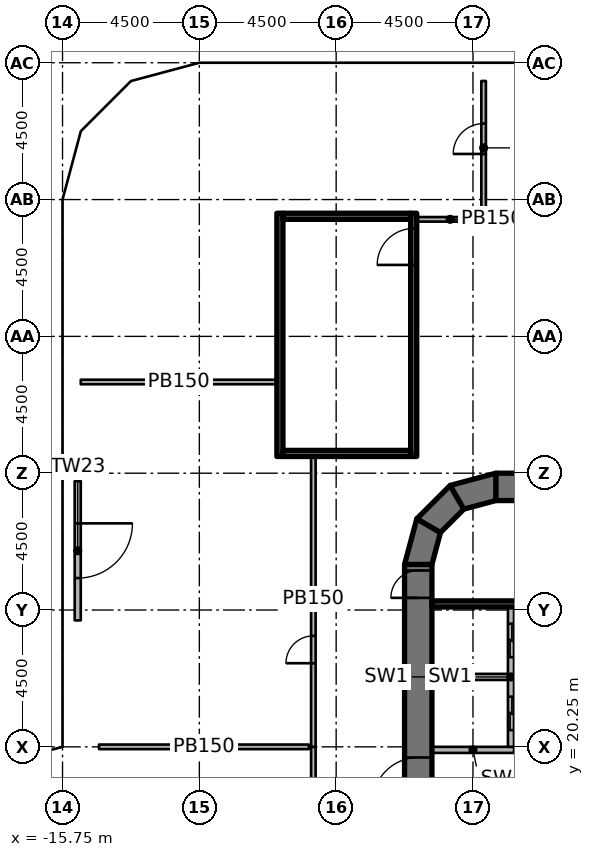
"""IFC4 building model, lengths in metres.
Left out: names, types, materials, properties, quantities, classifications, styles, units other than length and angle.
Written with IfcOpenShell. Run it as: python <this file> out.ifc"""

import sys

from ifc_helpers import new_model, si_unit, direction, frame, frame_2d, origin, origin_2d, place, context, subcontext, project, spatial, polyline, rectangle, outline, extrude, element, fill, save


model = new_model("IFC4")
c1 = context("Model", 3, precision=1e-05, world=origin(), true_north=direction((0.0, 1.0)))
c2 = subcontext(c1, "Body", "Model", "MODEL_VIEW")
j1 = project(units=[si_unit("LENGTHUNIT", "METRE"), si_unit("PLANEANGLEUNIT", "RADIAN")], contexts=[c1])
p1 = place(None, origin())
s1 = spatial("IfcSite", under=j1, at=p1, CompositionType="ELEMENT")
p2 = place(p1, origin())
s2 = spatial("IfcBuilding", under=s1, at=p2, CompositionType="ELEMENT")
p3 = place(p2, frame((0.0, 0.0, 17.0)))
s3 = spatial("IfcBuildingStorey", under=s2, at=p3, CompositionType="ELEMENT", Elevation=17.0)
for number, where, z_axis, x_axis in (
    (1, (-15.15, 19.65, 0.0), (0.0, 0.0, 1.0), (1.0, 0.0, 0.0)),
    (2, (-15.15, 33.75, 0.0), (0.0, 0.0, 1.0), (1.0, 0.0, 0.0)),
    (3, (-10.65, 29.25, 0.0), (0.0, 0.0, 1.0), (1.0, 0.0, 0.0)),
    (4, (-11.25, 41.97, 0.0), (0.0, 0.0, 1.0), (1.0, 0.0, 0.0)),
    (5, (-6.25, 20.25, 0.0), (0.0, 0.0, 1.0), (1.0, 0.0, 0.0)),
    (6, (-6.25, 24.65, 0.0), (0.0, 0.0, 1.0), (1.0, 0.0, 0.0)),
    (7, (-6.25, 26.7, 0.0), (0.0, 0.0, 1.0), (1.0, 0.0, 0.0)),
    (8, (-2.25, 33.11, 0.0), (0.0, 0.0, 1.0), (1.0, 0.0, 0.0)),
):
    element("IfcColumn", number, at=place(p3, frame(where, z_axis=z_axis, x_axis=x_axis)), inside=s3, PredefinedType="COLUMN", context=c2, shape_type="SweptSolid", body=[
        extrude(rectangle(XDim=1.2, YDim=1.2, at=origin_2d()), origin(), (0.0, 0.0, 1.0), 4.55),
    ])
p4 = place(p3, frame((-4.05, 11.25, 0.0), z_axis=(0.0, 0.0, 1.0), x_axis=(0.0, 1.0, 0.0)))
e9 = element("IfcWall", 9, at=p4, inside=s3, PredefinedType="SHEAR", context=c2, shape_type="SweptSolid", body=[
    extrude(rectangle(XDim=15.0, YDim=0.9, at=frame_2d((7.5, 0.0))), origin(), (0.0, 0.0, 1.0), 5.0),
])
p5 = place(p4, frame((7.15, 0.0, 0.0)))
e10 = element("IfcOpeningElement", 10, at=p5, cuts=e9, PredefinedType="OPENING", context=c2, shape_type="SweptSolid", body=[
    extrude(rectangle(XDim=1.5, YDim=2.3, at=frame_2d((0.75, 1.15))), frame((0.0, 0.46, 0.0), z_axis=(0.0, -1.0, 0.0), x_axis=(1.0, 0.0, 0.0)), (0.0, 0.0, 1.0), 0.92),
])
p6 = place(p4, frame((13.9, 0.0, 0.0)))
e11 = element("IfcOpeningElement", 11, at=p6, cuts=e9, PredefinedType="OPENING", context=c2, shape_type="SweptSolid", body=[
    extrude(rectangle(XDim=0.9, YDim=2.1, at=frame_2d((0.45, 1.05))), frame((0.0, 0.46, 0.0), z_axis=(0.0, -1.0, 0.0), x_axis=(1.0, 0.0, 0.0)), (0.0, 0.0, 1.0), 0.92),
])
p7 = place(p4, frame((1.15, 0.0, 0.0)))
e12 = element("IfcOpeningElement", 12, at=p7, cuts=e9, PredefinedType="OPENING", context=c2, shape_type="SweptSolid", body=[
    extrude(rectangle(XDim=1.2, YDim=2.1, at=frame_2d((0.6, 1.05))), frame((0.0, 0.46, 0.0), z_axis=(0.0, -1.0, 0.0), x_axis=(1.0, 0.0, 0.0)), (0.0, 0.0, 1.0), 0.92),
])
p8 = place(p3, frame((-1.5, 28.8, 0.0), z_axis=(0.0, 0.0, 1.0), x_axis=(1.0, 0.0, 0.0)))
e13 = element("IfcWall", 13, at=p8, inside=s3, PredefinedType="SHEAR", context=c2, shape_type="SweptSolid", body=[
    extrude(rectangle(XDim=3.0, YDim=0.9, at=frame_2d((1.5, 0.0))), origin(), (0.0, 0.0, 1.0), 5.0),
])
p9 = place(p3, origin())
e14 = element("IfcWall", 14, at=p9, inside=s3, PredefinedType="SHEAR", context=c2, shape_type="SweptSolid", body=[
    extrude(outline(polyline([(-4.5, 26.25), (-4.098, 27.75), (-3.319, 27.3), (-3.6, 26.25), (-4.5, 26.25)])), origin(), (0.0, 0.0, 1.0), 5.0),
])
p10 = place(p3, origin())
e15 = element("IfcWall", 15, at=p10, inside=s3, PredefinedType="SHEAR", context=c2, shape_type="SweptSolid", body=[
    extrude(outline(polyline([(-4.098, 27.75), (-3.0, 28.848), (-2.55, 28.069), (-3.319, 27.3), (-4.098, 27.75)])), origin(), (0.0, 0.0, 1.0), 5.0),
])
p11 = place(p3, origin())
e16 = element("IfcWall", 16, at=p11, inside=s3, PredefinedType="SHEAR", context=c2, shape_type="SweptSolid", body=[
    extrude(outline(polyline([(-3.0, 28.848), (-1.5, 29.25), (-1.5, 28.35), (-2.55, 28.069), (-3.0, 28.848)])), origin(), (0.0, 0.0, 1.0), 5.0),
])
p12 = place(p3, frame((-15.25, 28.99, 0.0), z_axis=(0.0, 0.0, 1.0), x_axis=(0.0, -1.0, 0.0)))
e17 = element("IfcWall", 17, at=p12, inside=s3, PredefinedType="SOLIDWALL", context=c2, shape_type="SweptSolid", body=[
    extrude(rectangle(XDim=4.58, YDim=0.2, at=frame_2d((2.29, 0.0))), origin(), (0.0, 0.0, 1.0), 4.55),
])
p13 = place(p12, frame((1.39, 0.0, 0.0)))
e18 = element("IfcOpeningElement", 18, at=p13, cuts=e17, PredefinedType="OPENING", context=c2, shape_type="SweptSolid", body=[
    extrude(rectangle(XDim=1.8, YDim=2.4, at=frame_2d((0.9, 1.2))), frame((0.0, 0.11, 0.0), z_axis=(0.0, -1.0, 0.0), x_axis=(1.0, 0.0, 0.0)), (0.0, 0.0, 1.0), 0.22),
])
p14 = place(p3, frame((-3.6, 24.95, 0.0), z_axis=(0.0, 0.0, 1.0), x_axis=(1.0, 0.0, 0.0)))
e19 = element("IfcWall", 19, at=p14, inside=s3, PredefinedType="SHEAR", context=c2, shape_type="SweptSolid", body=[
    extrude(rectangle(XDim=7.2, YDim=0.2, at=frame_2d((3.6, 0.0))), origin(), (0.0, 0.0, 1.0), 4.55),
])
p15 = place(p3, frame((-3.6, 20.15, 0.0), z_axis=(0.0, 0.0, 1.0), x_axis=(1.0, 0.0, 0.0)))
e20 = element("IfcWall", 20, at=p15, inside=s3, PredefinedType="PARTITIONING", context=c2, shape_type="SweptSolid", body=[
    extrude(rectangle(XDim=2.7, YDim=0.2, at=frame_2d((1.35, 0.0))), origin(), (0.0, 0.0, 1.0), 4.55),
])
p16 = place(p3, frame((-1.0, 24.85, 0.0), z_axis=(0.0, 0.0, 1.0), x_axis=(0.0, -1.0, 0.0)))
e21 = element("IfcWall", 21, at=p16, inside=s3, PredefinedType="PARTITIONING", context=c2, shape_type="SweptSolid", body=[
    extrude(rectangle(XDim=4.6, YDim=0.2, at=frame_2d((2.3, 0.0))), origin(), (0.0, 0.0, 1.0), 4.55),
])
p17 = place(p16, frame((0.55, 0.0, 0.0)))
e22 = element("IfcOpeningElement", 22, at=p17, cuts=e21, PredefinedType="OPENING", context=c2, shape_type="SweptSolid", body=[
    extrude(rectangle(XDim=1.1, YDim=2.3, at=frame_2d((0.55, 1.15))), frame((0.0, 0.11, 0.0), z_axis=(0.0, -1.0, 0.0), x_axis=(1.0, 0.0, 0.0)), (0.0, 0.0, 1.0), 0.22),
])
p18 = place(p16, frame((2.95, 0.0, 0.0)))
e23 = element("IfcOpeningElement", 23, at=p18, cuts=e21, PredefinedType="OPENING", context=c2, shape_type="SweptSolid", body=[
    extrude(rectangle(XDim=1.1, YDim=2.3, at=frame_2d((0.55, 1.15))), frame((0.0, 0.11, 0.0), z_axis=(0.0, -1.0, 0.0), x_axis=(1.0, 0.0, 0.0)), (0.0, 0.0, 1.0), 0.22),
])
p19 = place(p3, frame((-3.6, 22.55, 0.0), z_axis=(0.0, 0.0, 1.0), x_axis=(1.0, 0.0, 0.0)))
e24 = element("IfcWall", 24, at=p19, inside=s3, PredefinedType="PARTITIONING", context=c2, shape_type="SweptSolid", body=[
    extrude(rectangle(XDim=2.5, YDim=0.2, at=frame_2d((1.25, 0.0))), origin(), (0.0, 0.0, 1.0), 4.55),
])
p20 = place(p3, frame((-8.6, 29.8, 0.0), z_axis=(0.0, 0.0, 1.0), x_axis=(0.0, 1.0, 0.0)))
e25 = element("IfcWall", 25, at=p20, inside=s3, PredefinedType="SHEAR", context=c2, shape_type="SweptSolid", body=[
    extrude(rectangle(XDim=8.0, YDim=0.2, at=frame_2d((4.0, 0.0))), origin(), (0.0, 0.0, 1.0), 4.55),
])
p21 = place(p3, frame((-4.2, 29.8, 0.0), z_axis=(0.0, 0.0, 1.0), x_axis=(0.0, 1.0, 0.0)))
e26 = element("IfcWall", 26, at=p21, inside=s3, PredefinedType="SHEAR", context=c2, shape_type="SweptSolid", body=[
    extrude(rectangle(XDim=8.0, YDim=0.2, at=frame_2d((4.0, 0.0))), origin(), (0.0, 0.0, 1.0), 4.55),
])
p22 = place(p21, frame((6.3, 0.0, 0.0)))
e27 = element("IfcOpeningElement", 27, at=p22, cuts=e26, PredefinedType="OPENING", context=c2, shape_type="SweptSolid", body=[
    extrude(rectangle(XDim=1.2, YDim=2.1, at=frame_2d((0.6, 1.05))), frame((0.0, 0.11, 0.0), z_axis=(0.0, -1.0, 0.0), x_axis=(1.0, 0.0, 0.0)), (0.0, 0.0, 1.0), 0.22),
])
for number, where, z_axis, x_axis in (
    (28, (-8.5, 29.9, 0.0), (0.0, 0.0, 1.0), (1.0, 0.0, 0.0)),
    (29, (-8.5, 37.7, 0.0), (0.0, 0.0, 1.0), (1.0, 0.0, 0.0)),
):
    element("IfcWall", number, at=place(p3, frame(where, z_axis=z_axis, x_axis=x_axis)), inside=s3, PredefinedType="SHEAR", context=c2, shape_type="SweptSolid", body=[
        extrude(rectangle(XDim=4.2, YDim=0.2, at=frame_2d((2.1, 0.0))), origin(), (0.0, 0.0, 1.0), 4.55),
    ])
p23 = place(p3, frame((-4.1, 37.6, 0.0), z_axis=(0.0, 0.0, 1.0), x_axis=(1.0, 0.0, 0.0)))
e30 = element("IfcWall", 30, at=p23, inside=s3, PredefinedType="PARTITIONING", context=c2, shape_type="SweptSolid", body=[
    extrude(rectangle(XDim=2.2, YDim=0.15, at=frame_2d((1.1, 0.0))), origin(), (0.0, 0.0, 1.0), 4.55),
])
p24 = place(p3, frame((-7.5, 8.25, 0.0), z_axis=(0.0, 0.0, 1.0), x_axis=(0.0, 1.0, 0.0)))
e31 = element("IfcWall", 31, at=p24, inside=s3, PredefinedType="PARTITIONING", context=c2, shape_type="SweptSolid", body=[
    extrude(rectangle(XDim=12.0, YDim=0.15, at=frame_2d((6.0, 0.0))), origin(), (0.0, 0.0, 1.0), 4.55),
])
p25 = place(p24, frame((3.5, 0.0, 0.0)))
e32 = element("IfcOpeningElement", 32, at=p25, cuts=e31, PredefinedType="OPENING", context=c2, shape_type="SweptSolid", body=[
    extrude(rectangle(XDim=1.0, YDim=2.1, at=frame_2d((0.5, 1.05))), frame((0.0, 0.085, 0.0), z_axis=(0.0, -1.0, 0.0), x_axis=(1.0, 0.0, 0.0)), (0.0, 0.0, 1.0), 0.17),
])
p26 = place(p3, frame((-7.5, 20.25, 0.0), z_axis=(0.0, 0.0, 1.0), x_axis=(0.0, 1.0, 0.0)))
e33 = element("IfcWall", 33, at=p26, inside=s3, PredefinedType="PARTITIONING", context=c2, shape_type="SweptSolid", body=[
    extrude(rectangle(XDim=9.75, YDim=0.15, at=frame_2d((4.875, 0.0))), origin(), (0.0, 0.0, 1.0), 4.55),
])
p27 = place(p26, frame((2.75, 0.0, 0.0)))
e34 = element("IfcOpeningElement", 34, at=p27, cuts=e33, PredefinedType="OPENING", context=c2, shape_type="SweptSolid", body=[
    extrude(rectangle(XDim=0.9, YDim=2.1, at=frame_2d((0.45, 1.05))), frame((0.0, 0.085, 0.0), z_axis=(0.0, -1.0, 0.0), x_axis=(1.0, 0.0, 0.0)), (0.0, 0.0, 1.0), 0.17),
])
p28 = place(p3, frame((-1.9, 37.75, 0.0), z_axis=(0.0, 0.0, 1.0), x_axis=(0.0, 1.0, 0.0)))
e35 = element("IfcWall", 35, at=p28, inside=s3, PredefinedType="PARTITIONING", context=c2, shape_type="SweptSolid", body=[
    extrude(rectangle(XDim=4.4, YDim=0.15, at=frame_2d((2.2, 0.0))), origin(), (0.0, 0.0, 1.0), 4.55),
])
p29 = place(p28, frame((2.0, 0.0, 0.0)))
e36 = element("IfcOpeningElement", 36, at=p29, cuts=e35, PredefinedType="OPENING", context=c2, shape_type="SweptSolid", body=[
    extrude(rectangle(XDim=1.0, YDim=2.1, at=frame_2d((0.5, 1.05))), frame((0.0, 0.085, 0.0), z_axis=(0.0, -1.0, 0.0), x_axis=(1.0, 0.0, 0.0)), (0.0, 0.0, 1.0), 0.17),
])
p30 = place(p3, frame((-14.55, 20.25, 0.0), z_axis=(0.0, 0.0, 1.0), x_axis=(1.0, 0.0, 0.0)))
e37 = element("IfcWall", 37, at=p30, inside=s3, PredefinedType="PARTITIONING", context=c2, shape_type="SweptSolid", body=[
    extrude(rectangle(XDim=6.9, YDim=0.15, at=frame_2d((3.45, 0.0))), origin(), (0.0, 0.0, 1.0), 4.55),
])
p31 = place(p3, frame((-15.15, 32.25, 0.0), z_axis=(0.0, 0.0, 1.0), x_axis=(1.0, 0.0, 0.0)))
e38 = element("IfcWall", 38, at=p31, inside=s3, PredefinedType="PARTITIONING", context=c2, shape_type="SweptSolid", body=[
    extrude(rectangle(XDim=6.45, YDim=0.15, at=frame_2d((3.225, 0.0))), origin(), (0.0, 0.0, 1.0), 4.55),
])
p32 = place(p13, origin())
e39 = element("IfcDoor", 39, at=p32, inside=s3, OperationType="SINGLE_SWING_LEFT", PredefinedType="DOOR", context=c2, shape_type="SweptSolid", body=[
    extrude(rectangle(XDim=1.8, YDim=2.4, at=frame_2d((0.9, 1.2))), frame((0.0, 0.025, 0.0), z_axis=(0.0, -1.0, 0.0), x_axis=(1.0, 0.0, 0.0)), (0.0, 0.0, 1.0), 0.05),
])
fill(e18, e39)
p33 = place(p5, origin())
e40 = element("IfcDoor", 40, at=p33, inside=s3, OperationType="DOUBLE_DOOR_SINGLE_SWING", PredefinedType="DOOR", context=c2, shape_type="SweptSolid", body=[
    extrude(rectangle(XDim=1.5, YDim=2.3, at=frame_2d((0.75, 1.15))), frame((0.0, 0.025, 0.0), z_axis=(0.0, -1.0, 0.0), x_axis=(1.0, 0.0, 0.0)), (0.0, 0.0, 1.0), 0.05),
])
fill(e10, e40)
p34 = place(p6, origin())
e41 = element("IfcDoor", 41, at=p34, inside=s3, OperationType="SINGLE_SWING_LEFT", PredefinedType="DOOR", context=c2, shape_type="SweptSolid", body=[
    extrude(rectangle(XDim=0.9, YDim=2.1, at=frame_2d((0.45, 1.05))), frame((0.0, 0.025, 0.0), z_axis=(0.0, -1.0, 0.0), x_axis=(1.0, 0.0, 0.0)), (0.0, 0.0, 1.0), 0.05),
])
fill(e11, e41)
p35 = place(p17, origin())
e42 = element("IfcDoor", 42, at=p35, inside=s3, OperationType="DOUBLE_DOOR_SLIDING", PredefinedType="DOOR", context=c2, shape_type="SweptSolid", body=[
    extrude(rectangle(XDim=1.1, YDim=2.3, at=frame_2d((0.55, 1.15))), frame((0.0, 0.025, 0.0), z_axis=(0.0, -1.0, 0.0), x_axis=(1.0, 0.0, 0.0)), (0.0, 0.0, 1.0), 0.05),
])
fill(e22, e42)
p36 = place(p18, origin())
e43 = element("IfcDoor", 43, at=p36, inside=s3, OperationType="DOUBLE_DOOR_SLIDING", PredefinedType="DOOR", context=c2, shape_type="SweptSolid", body=[
    extrude(rectangle(XDim=1.1, YDim=2.3, at=frame_2d((0.55, 1.15))), frame((0.0, 0.025, 0.0), z_axis=(0.0, -1.0, 0.0), x_axis=(1.0, 0.0, 0.0)), (0.0, 0.0, 1.0), 0.05),
])
fill(e23, e43)
p37 = place(p22, origin())
e44 = element("IfcDoor", 44, at=p37, inside=s3, OperationType="SINGLE_SWING_RIGHT", PredefinedType="DOOR", context=c2, shape_type="SweptSolid", body=[
    extrude(rectangle(XDim=1.2, YDim=2.1, at=frame_2d((0.6, 1.05))), frame((0.0, 0.025, 0.0), z_axis=(0.0, -1.0, 0.0), x_axis=(1.0, 0.0, 0.0)), (0.0, 0.0, 1.0), 0.05),
])
fill(e27, e44)
p38 = place(p27, origin())
e45 = element("IfcDoor", 45, at=p38, inside=s3, OperationType="SINGLE_SWING_LEFT", PredefinedType="DOOR", context=c2, shape_type="SweptSolid", body=[
    extrude(rectangle(XDim=0.9, YDim=2.1, at=frame_2d((0.45, 1.05))), frame((0.0, 0.025, 0.0), z_axis=(0.0, -1.0, 0.0), x_axis=(1.0, 0.0, 0.0)), (0.0, 0.0, 1.0), 0.05),
])
fill(e34, e45)
p39 = place(p29, origin())
e46 = element("IfcDoor", 46, at=p39, inside=s3, OperationType="SINGLE_SWING_LEFT", PredefinedType="DOOR", context=c2, shape_type="SweptSolid", body=[
    extrude(rectangle(XDim=1.0, YDim=2.1, at=frame_2d((0.5, 1.05))), frame((0.0, 0.025, 0.0), z_axis=(0.0, -1.0, 0.0), x_axis=(1.0, 0.0, 0.0)), (0.0, 0.0, 1.0), 0.05),
])
fill(e36, e46)
save(model, sys.argv[1])
